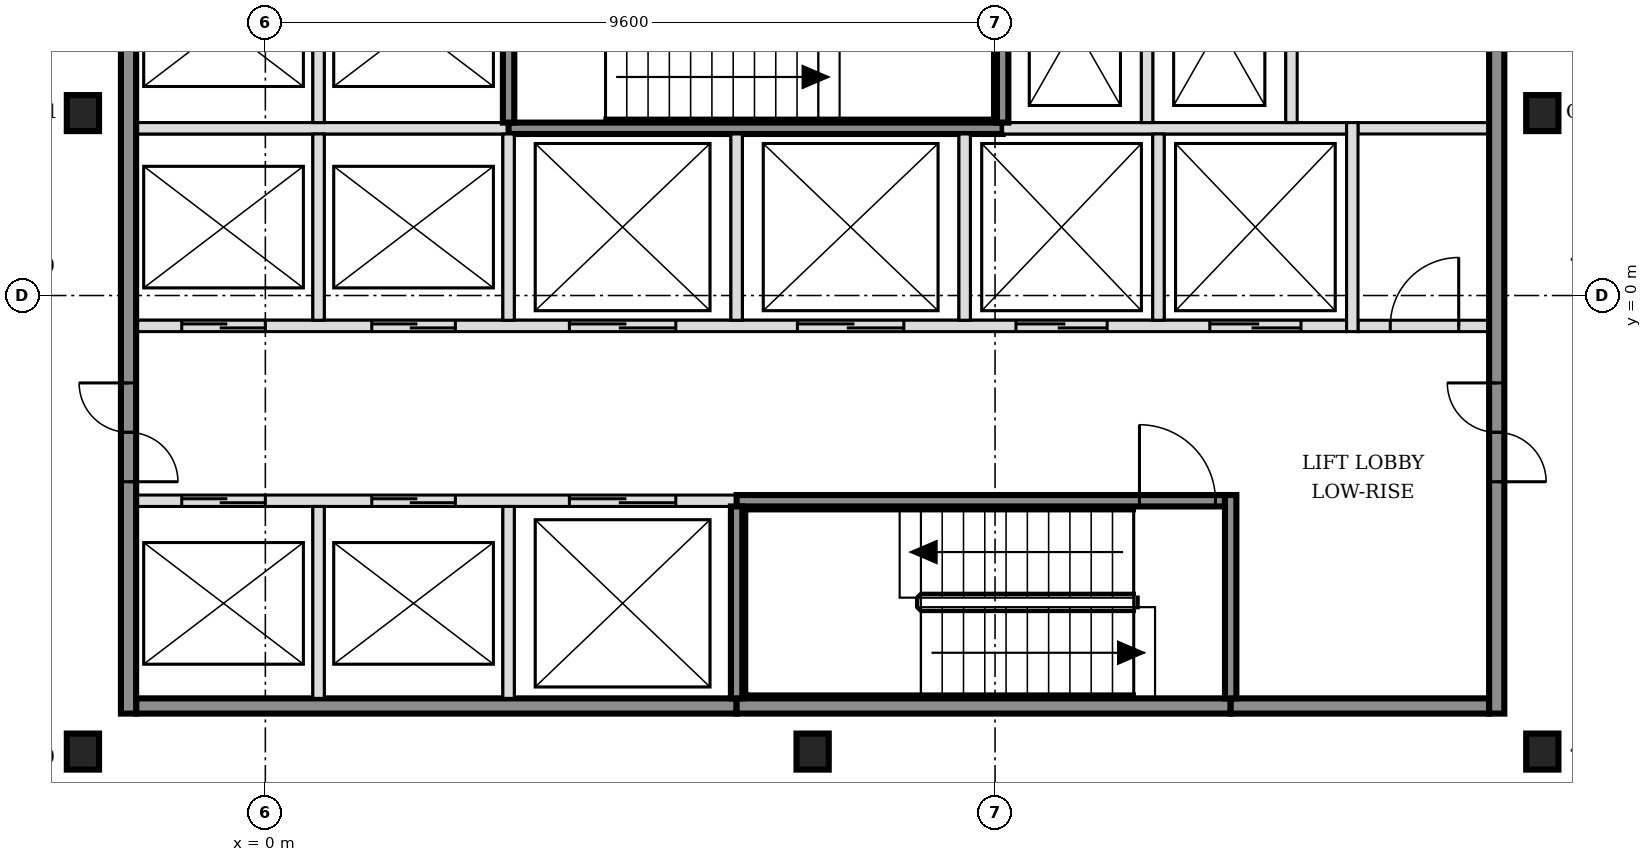
"""IFC4 building model, lengths in metres.
Left out: names, types, materials, properties, quantities, classifications, styles, units other than length and angle.
Written with IfcOpenShell. Run it as: python <this file> out.ifc"""

import sys

from ifc_helpers import new_model, si_unit, direction, frame, frame_2d, origin, origin_2d, place, context, subcontext, project, spatial, rectangle, i_section, extrude, element, fill, save


model = new_model("IFC4")
c1 = context("Model", 3, precision=1e-05, world=origin(), true_north=direction((0.0, 1.0)))
c2 = subcontext(c1, "Body", "Model", "MODEL_VIEW")
j1 = project(units=[si_unit("LENGTHUNIT", "METRE"), si_unit("PLANEANGLEUNIT", "RADIAN")], contexts=[c1])
p1 = place(None, origin())
s1 = spatial("IfcSite", under=j1, at=p1, CompositionType="ELEMENT")
p2 = place(p1, origin())
s2 = spatial("IfcBuilding", under=s1, at=p2, CompositionType="ELEMENT")
p3 = place(p2, frame((0.0, 0.0, 125.4)))
s3 = spatial("IfcBuildingStorey", under=s2, at=p3, CompositionType="ELEMENT", Elevation=125.4)
for number, where, z_axis, x_axis in (
    (1, (-2.4, -6.0, -0.15), (0.0, 0.0, 1.0), (1.0, 0.0, 0.0)),
    (2, (7.2, -6.0, -0.15), (0.0, 0.0, 1.0), (1.0, 0.0, 0.0)),
    (3, (16.8, -6.0, -0.15), (0.0, 0.0, 1.0), (1.0, 0.0, 0.0)),
    (4, (-2.4, 2.4, -0.15), (0.0, 0.0, 1.0), (1.0, 0.0, 0.0)),
    (5, (16.8, 2.4, -0.15), (0.0, 0.0, 1.0), (1.0, 0.0, 0.0)),
):
    element("IfcColumn", number, at=place(p3, frame(where, z_axis=z_axis, x_axis=x_axis)), inside=s3, PredefinedType="COLUMN", context=c2, shape_type="SweptSolid", body=[
        extrude(i_section(OverallWidth=0.424, OverallDepth=0.474, WebThickness=0.048, FlangeThickness=0.077, FilletRadius=0.015, at=origin_2d()), origin(), (0.0, 0.0, 1.0), 3.6),
    ])
p4 = place(p3, frame((-1.7, -5.4, 0.0), z_axis=(0.0, 0.0, 1.0), x_axis=(1.0, 0.0, 0.0)))
e6 = element("IfcWall", 6, at=p4, inside=s3, PredefinedType="SOLIDWALL", context=c2, shape_type="SweptSolid", body=[
    extrude(rectangle(XDim=7.9, YDim=0.2, at=frame_2d((3.95, 0.0))), origin(), (0.0, 0.0, 1.0), 3.45),
])
p5 = place(p3, frame((6.2, -5.4, 0.0), z_axis=(0.0, 0.0, 1.0), x_axis=(1.0, 0.0, 0.0)))
e7 = element("IfcWall", 7, at=p5, inside=s3, PredefinedType="SOLIDWALL", context=c2, shape_type="SweptSolid", body=[
    extrude(rectangle(XDim=6.5, YDim=0.2, at=frame_2d((3.25, 0.0))), origin(), (0.0, 0.0, 1.0), 3.45),
])
p6 = place(p3, frame((12.7, -5.4, 0.0), z_axis=(0.0, 0.0, 1.0), x_axis=(1.0, 0.0, 0.0)))
e8 = element("IfcWall", 8, at=p6, inside=s3, PredefinedType="SOLIDWALL", context=c2, shape_type="SweptSolid", body=[
    extrude(rectangle(XDim=3.4, YDim=0.2, at=frame_2d((1.7, 0.0))), origin(), (0.0, 0.0, 1.0), 3.45),
])
p7 = place(p3, frame((-1.7, -2.7, 0.0), z_axis=(0.0, 0.0, 1.0), x_axis=(1.0, 0.0, 0.0)))
e9 = element("IfcWall", 9, at=p7, inside=s3, PredefinedType="SOLIDWALL", context=c2, shape_type="SweptSolid", body=[
    extrude(rectangle(XDim=7.9, YDim=0.15, at=frame_2d((3.95, 0.0))), origin(), (0.0, 0.0, 1.0), 3.45),
])
p8 = place(p7, frame((0.6, 0.0, 0.0)))
e10 = element("IfcOpeningElement", 10, at=p8, cuts=e9, PredefinedType="OPENING", context=c2, shape_type="SweptSolid", body=[
    extrude(rectangle(XDim=1.1, YDim=2.1, at=frame_2d((0.55, 1.05))), frame((0.0, 0.085, 0.0), z_axis=(0.0, -1.0, 0.0), x_axis=(1.0, 0.0, 0.0)), (0.0, 0.0, 1.0), 0.17),
])
p9 = place(p7, frame((3.1, 0.0, 0.0)))
e11 = element("IfcOpeningElement", 11, at=p9, cuts=e9, PredefinedType="OPENING", context=c2, shape_type="SweptSolid", body=[
    extrude(rectangle(XDim=1.1, YDim=2.1, at=frame_2d((0.55, 1.05))), frame((0.0, 0.085, 0.0), z_axis=(0.0, -1.0, 0.0), x_axis=(1.0, 0.0, 0.0)), (0.0, 0.0, 1.0), 0.17),
])
p10 = place(p7, frame((5.7, 0.0, 0.0)))
e12 = element("IfcOpeningElement", 12, at=p10, cuts=e9, PredefinedType="OPENING", context=c2, shape_type="SweptSolid", body=[
    extrude(rectangle(XDim=1.4, YDim=2.1, at=frame_2d((0.7, 1.05))), frame((0.0, 0.085, 0.0), z_axis=(0.0, -1.0, 0.0), x_axis=(1.0, 0.0, 0.0)), (0.0, 0.0, 1.0), 0.17),
])
p11 = place(p3, frame((6.2, -2.7, 0.0), z_axis=(0.0, 0.0, 1.0), x_axis=(1.0, 0.0, 0.0)))
e13 = element("IfcWall", 13, at=p11, inside=s3, PredefinedType="SOLIDWALL", context=c2, shape_type="SweptSolid", body=[
    extrude(rectangle(XDim=6.425, YDim=0.15, at=frame_2d((3.212, 0.0))), origin(), (0.0, 0.0, 1.0), 3.45),
])
p12 = place(p11, frame((5.3, 0.0, 0.0)))
e14 = element("IfcOpeningElement", 14, at=p12, cuts=e13, PredefinedType="OPENING", context=c2, shape_type="SweptSolid", body=[
    extrude(rectangle(XDim=1.0, YDim=2.1, at=frame_2d((0.5, 1.05))), frame((0.0, 0.085, 0.0), z_axis=(0.0, -1.0, 0.0), x_axis=(1.0, 0.0, 0.0)), (0.0, 0.0, 1.0), 0.17),
])
p13 = place(p3, frame((-1.7, -0.4, 0.0), z_axis=(0.0, 0.0, 1.0), x_axis=(1.0, 0.0, 0.0)))
e15 = element("IfcWall", 15, at=p13, inside=s3, PredefinedType="SOLIDWALL", context=c2, shape_type="SweptSolid", body=[
    extrude(rectangle(XDim=15.925, YDim=0.15, at=frame_2d((7.962, 0.0))), origin(), (0.0, 0.0, 1.0), 3.45),
])
p14 = place(p13, frame((0.6, 0.0, 0.0)))
e16 = element("IfcOpeningElement", 16, at=p14, cuts=e15, PredefinedType="OPENING", context=c2, shape_type="SweptSolid", body=[
    extrude(rectangle(XDim=1.1, YDim=2.1, at=frame_2d((0.55, 1.05))), frame((0.0, 0.085, 0.0), z_axis=(0.0, -1.0, 0.0), x_axis=(1.0, 0.0, 0.0)), (0.0, 0.0, 1.0), 0.17),
])
p15 = place(p13, frame((3.1, 0.0, 0.0)))
e17 = element("IfcOpeningElement", 17, at=p15, cuts=e15, PredefinedType="OPENING", context=c2, shape_type="SweptSolid", body=[
    extrude(rectangle(XDim=1.1, YDim=2.1, at=frame_2d((0.55, 1.05))), frame((0.0, 0.085, 0.0), z_axis=(0.0, -1.0, 0.0), x_axis=(1.0, 0.0, 0.0)), (0.0, 0.0, 1.0), 0.17),
])
p16 = place(p13, frame((5.7, 0.0, 0.0)))
e18 = element("IfcOpeningElement", 18, at=p16, cuts=e15, PredefinedType="OPENING", context=c2, shape_type="SweptSolid", body=[
    extrude(rectangle(XDim=1.4, YDim=2.1, at=frame_2d((0.7, 1.05))), frame((0.0, 0.085, 0.0), z_axis=(0.0, -1.0, 0.0), x_axis=(1.0, 0.0, 0.0)), (0.0, 0.0, 1.0), 0.17),
])
p17 = place(p13, frame((8.7, 0.0, 0.0)))
e19 = element("IfcOpeningElement", 19, at=p17, cuts=e15, PredefinedType="OPENING", context=c2, shape_type="SweptSolid", body=[
    extrude(rectangle(XDim=1.4, YDim=2.1, at=frame_2d((0.7, 1.05))), frame((0.0, 0.085, 0.0), z_axis=(0.0, -1.0, 0.0), x_axis=(1.0, 0.0, 0.0)), (0.0, 0.0, 1.0), 0.17),
])
p18 = place(p13, frame((11.575, 0.0, 0.0)))
e20 = element("IfcOpeningElement", 20, at=p18, cuts=e15, PredefinedType="OPENING", context=c2, shape_type="SweptSolid", body=[
    extrude(rectangle(XDim=1.2, YDim=2.1, at=frame_2d((0.6, 1.05))), frame((0.0, 0.085, 0.0), z_axis=(0.0, -1.0, 0.0), x_axis=(1.0, 0.0, 0.0)), (0.0, 0.0, 1.0), 0.17),
])
p19 = place(p13, frame((14.125, 0.0, 0.0)))
e21 = element("IfcOpeningElement", 21, at=p19, cuts=e15, PredefinedType="OPENING", context=c2, shape_type="SweptSolid", body=[
    extrude(rectangle(XDim=1.2, YDim=2.1, at=frame_2d((0.6, 1.05))), frame((0.0, 0.085, 0.0), z_axis=(0.0, -1.0, 0.0), x_axis=(1.0, 0.0, 0.0)), (0.0, 0.0, 1.0), 0.17),
])
p20 = place(p3, frame((14.375, -0.4, 0.0), z_axis=(0.0, 0.0, 1.0), x_axis=(1.0, 0.0, 0.0)))
e22 = element("IfcWall", 22, at=p20, inside=s3, PredefinedType="PARTITIONING", context=c2, shape_type="SweptSolid", body=[
    extrude(rectangle(XDim=1.725, YDim=0.15, at=frame_2d((0.863, 0.0))), origin(), (0.0, 0.0, 1.0), 3.45),
])
p21 = place(p20, frame((0.425, 0.0, 0.0)))
e23 = element("IfcOpeningElement", 23, at=p21, cuts=e22, PredefinedType="OPENING", context=c2, shape_type="SweptSolid", body=[
    extrude(rectangle(XDim=0.9, YDim=2.1, at=frame_2d((0.45, 1.05))), frame((0.0, 0.085, 0.0), z_axis=(0.0, -1.0, 0.0), x_axis=(1.0, 0.0, 0.0)), (0.0, 0.0, 1.0), 0.17),
])
p22 = place(p3, frame((-1.7, 2.2, 0.0), z_axis=(0.0, 0.0, 1.0), x_axis=(1.0, 0.0, 0.0)))
e24 = element("IfcWall", 24, at=p22, inside=s3, PredefinedType="SOLIDWALL", context=c2, shape_type="SweptSolid", body=[
    extrude(rectangle(XDim=4.9, YDim=0.15, at=frame_2d((2.45, 0.0))), origin(), (0.0, 0.0, 1.0), 3.45),
])
p23 = place(p3, frame((3.2, 2.2, 0.0), z_axis=(0.0, 0.0, 1.0), x_axis=(1.0, 0.0, 0.0)))
e25 = element("IfcWall", 25, at=p23, inside=s3, PredefinedType="SOLIDWALL", context=c2, shape_type="SweptSolid", body=[
    extrude(rectangle(XDim=6.5, YDim=0.15, at=frame_2d((3.25, 0.0))), origin(), (0.0, 0.0, 1.0), 3.45),
])
p24 = place(p3, frame((9.7, 2.2, 0.0), z_axis=(0.0, 0.0, 1.0), x_axis=(1.0, 0.0, 0.0)))
e26 = element("IfcWall", 26, at=p24, inside=s3, PredefinedType="SOLIDWALL", context=c2, shape_type="SweptSolid", body=[
    extrude(rectangle(XDim=4.525, YDim=0.15, at=frame_2d((2.263, 0.0))), origin(), (0.0, 0.0, 1.0), 3.45),
])
p25 = place(p3, frame((14.375, 2.2, 0.0), z_axis=(0.0, 0.0, 1.0), x_axis=(1.0, 0.0, 0.0)))
e27 = element("IfcWall", 27, at=p25, inside=s3, PredefinedType="PARTITIONING", context=c2, shape_type="SweptSolid", body=[
    extrude(rectangle(XDim=1.725, YDim=0.15, at=frame_2d((0.863, 0.0))), origin(), (0.0, 0.0, 1.0), 3.45),
])
p26 = place(p3, frame((-1.8, -5.5, 0.0), z_axis=(0.0, 0.0, 1.0), x_axis=(0.0, 1.0, 0.0)))
e28 = element("IfcWall", 28, at=p26, inside=s3, PredefinedType="SOLIDWALL", context=c2, shape_type="SweptSolid", body=[
    extrude(rectangle(XDim=15.8, YDim=0.2, at=frame_2d((7.9, 0.0))), origin(), (0.0, 0.0, 1.0), 3.45),
])
p27 = place(p26, frame((3.05, 0.0, 0.0)))
e29 = element("IfcOpeningElement", 29, at=p27, cuts=e28, PredefinedType="OPENING", context=c2, shape_type="SweptSolid", body=[
    extrude(rectangle(XDim=1.3, YDim=2.1, at=frame_2d((0.65, 1.05))), frame((0.0, 0.11, 0.0), z_axis=(0.0, -1.0, 0.0), x_axis=(1.0, 0.0, 0.0)), (0.0, 0.0, 1.0), 0.22),
])
p28 = place(p26, frame((11.45, 0.0, 0.0)))
e30 = element("IfcOpeningElement", 30, at=p28, cuts=e28, PredefinedType="OPENING", context=c2, shape_type="SweptSolid", body=[
    extrude(rectangle(XDim=1.3, YDim=2.1, at=frame_2d((0.65, 1.05))), frame((0.0, 0.11, 0.0), z_axis=(0.0, -1.0, 0.0), x_axis=(1.0, 0.0, 0.0)), (0.0, 0.0, 1.0), 0.22),
])
p29 = place(p3, frame((0.7, -5.3, 0.0), z_axis=(0.0, 0.0, 1.0), x_axis=(0.0, 1.0, 0.0)))
e31 = element("IfcWall", 31, at=p29, inside=s3, PredefinedType="SOLIDWALL", context=c2, shape_type="SweptSolid", body=[
    extrude(rectangle(XDim=2.525, YDim=0.15, at=frame_2d((1.263, 0.0))), origin(), (0.0, 0.0, 1.0), 3.45),
])
p30 = place(p3, frame((0.7, -0.325, 0.0), z_axis=(0.0, 0.0, 1.0), x_axis=(0.0, 1.0, 0.0)))
e32 = element("IfcWall", 32, at=p30, inside=s3, PredefinedType="SOLIDWALL", context=c2, shape_type="SweptSolid", body=[
    extrude(rectangle(XDim=2.45, YDim=0.15, at=frame_2d((1.225, 0.0))), origin(), (0.0, 0.0, 1.0), 3.45),
])
p31 = place(p3, frame((0.7, 2.275, 0.0), z_axis=(0.0, 0.0, 1.0), x_axis=(0.0, 1.0, 0.0)))
e33 = element("IfcWall", 33, at=p31, inside=s3, PredefinedType="SOLIDWALL", context=c2, shape_type="SweptSolid", body=[
    extrude(rectangle(XDim=2.55, YDim=0.15, at=frame_2d((1.275, 0.0))), origin(), (0.0, 0.0, 1.0), 3.45),
])
p32 = place(p3, frame((3.2, -5.3, 0.0), z_axis=(0.0, 0.0, 1.0), x_axis=(0.0, 1.0, 0.0)))
e34 = element("IfcWall", 34, at=p32, inside=s3, PredefinedType="SOLIDWALL", context=c2, shape_type="SweptSolid", body=[
    extrude(rectangle(XDim=2.525, YDim=0.15, at=frame_2d((1.263, 0.0))), origin(), (0.0, 0.0, 1.0), 3.45),
])
p33 = place(p3, frame((3.2, -0.325, 0.0), z_axis=(0.0, 0.0, 1.0), x_axis=(0.0, 1.0, 0.0)))
e35 = element("IfcWall", 35, at=p33, inside=s3, PredefinedType="SOLIDWALL", context=c2, shape_type="SweptSolid", body=[
    extrude(rectangle(XDim=2.45, YDim=0.15, at=frame_2d((1.225, 0.0))), origin(), (0.0, 0.0, 1.0), 3.45),
])
p34 = place(p3, frame((3.2, 2.275, 0.0), z_axis=(0.0, 0.0, 1.0), x_axis=(0.0, 1.0, 0.0)))
e36 = element("IfcWall", 36, at=p34, inside=s3, PredefinedType="SOLIDWALL", context=c2, shape_type="SweptSolid", body=[
    extrude(rectangle(XDim=2.55, YDim=0.15, at=frame_2d((1.275, 0.0))), origin(), (0.0, 0.0, 1.0), 3.45),
])
p35 = place(p3, frame((6.2, -5.3, 0.0), z_axis=(0.0, 0.0, 1.0), x_axis=(0.0, 1.0, 0.0)))
e37 = element("IfcWall", 37, at=p35, inside=s3, PredefinedType="SOLIDWALL", context=c2, shape_type="SweptSolid", body=[
    extrude(rectangle(XDim=2.525, YDim=0.15, at=frame_2d((1.263, 0.0))), origin(), (0.0, 0.0, 1.0), 3.45),
])
for number, where, z_axis, x_axis in (
    (38, (6.2, -0.325, 0.0), (0.0, 0.0, 1.0), (0.0, 1.0, 0.0)),
    (39, (9.2, -0.325, 0.0), (0.0, 0.0, 1.0), (0.0, 1.0, 0.0)),
):
    element("IfcWall", number, at=place(p3, frame(where, z_axis=z_axis, x_axis=x_axis)), inside=s3, PredefinedType="SOLIDWALL", context=c2, shape_type="SweptSolid", body=[
        extrude(rectangle(XDim=2.45, YDim=0.15, at=frame_2d((1.225, 0.0))), origin(), (0.0, 0.0, 1.0), 3.45),
    ])
for number, where, z_axis, x_axis in (
    (40, (9.7, 2.275, 0.0), (0.0, 0.0, 1.0), (0.0, 1.0, 0.0)),
    (41, (11.6, 2.275, 0.0), (0.0, 0.0, 1.0), (0.0, 1.0, 0.0)),
):
    element("IfcWall", number, at=place(p3, frame(where, z_axis=z_axis, x_axis=x_axis)), inside=s3, PredefinedType="SOLIDWALL", context=c2, shape_type="SweptSolid", body=[
        extrude(rectangle(XDim=2.55, YDim=0.15, at=frame_2d((1.275, 0.0))), origin(), (0.0, 0.0, 1.0), 3.45),
    ])
p36 = place(p3, frame((11.75, -0.325, 0.0), z_axis=(0.0, 0.0, 1.0), x_axis=(0.0, 1.0, 0.0)))
e42 = element("IfcWall", 42, at=p36, inside=s3, PredefinedType="SOLIDWALL", context=c2, shape_type="SweptSolid", body=[
    extrude(rectangle(XDim=2.45, YDim=0.15, at=frame_2d((1.225, 0.0))), origin(), (0.0, 0.0, 1.0), 3.45),
])
p37 = place(p3, frame((12.7, -5.3, 0.0), z_axis=(0.0, 0.0, 1.0), x_axis=(0.0, 1.0, 0.0)))
e43 = element("IfcWall", 43, at=p37, inside=s3, PredefinedType="SOLIDWALL", context=c2, shape_type="SweptSolid", body=[
    extrude(rectangle(XDim=2.675, YDim=0.15, at=frame_2d((1.337, 0.0))), origin(), (0.0, 0.0, 1.0), 3.45),
])
p38 = place(p3, frame((13.5, 2.275, 0.0), z_axis=(0.0, 0.0, 1.0), x_axis=(0.0, 1.0, 0.0)))
e44 = element("IfcWall", 44, at=p38, inside=s3, PredefinedType="SOLIDWALL", context=c2, shape_type="SweptSolid", body=[
    extrude(rectangle(XDim=2.55, YDim=0.15, at=frame_2d((1.275, 0.0))), origin(), (0.0, 0.0, 1.0), 3.45),
])
p39 = place(p3, frame((14.3, -0.475, 0.0), z_axis=(0.0, 0.0, 1.0), x_axis=(0.0, 1.0, 0.0)))
e45 = element("IfcWall", 45, at=p39, inside=s3, PredefinedType="SOLIDWALL", context=c2, shape_type="SweptSolid", body=[
    extrude(rectangle(XDim=2.75, YDim=0.15, at=frame_2d((1.375, 0.0))), origin(), (0.0, 0.0, 1.0), 3.45),
])
p40 = place(p3, frame((16.2, -5.5, 0.0), z_axis=(0.0, 0.0, 1.0), x_axis=(0.0, 1.0, 0.0)))
e46 = element("IfcWall", 46, at=p40, inside=s3, PredefinedType="SOLIDWALL", context=c2, shape_type="SweptSolid", body=[
    extrude(rectangle(XDim=15.8, YDim=0.2, at=frame_2d((7.9, 0.0))), origin(), (0.0, 0.0, 1.0), 3.45),
])
p41 = place(p40, frame((3.05, 0.0, 0.0)))
e47 = element("IfcOpeningElement", 47, at=p41, cuts=e46, PredefinedType="OPENING", context=c2, shape_type="SweptSolid", body=[
    extrude(rectangle(XDim=1.3, YDim=2.1, at=frame_2d((0.65, 1.05))), frame((0.0, 0.11, 0.0), z_axis=(0.0, -1.0, 0.0), x_axis=(1.0, 0.0, 0.0)), (0.0, 0.0, 1.0), 0.22),
])
p42 = place(p40, frame((11.45, 0.0, 0.0)))
e48 = element("IfcOpeningElement", 48, at=p42, cuts=e46, PredefinedType="OPENING", context=c2, shape_type="SweptSolid", body=[
    extrude(rectangle(XDim=1.3, YDim=2.1, at=frame_2d((0.65, 1.05))), frame((0.0, 0.11, 0.0), z_axis=(0.0, -1.0, 0.0), x_axis=(1.0, 0.0, 0.0)), (0.0, 0.0, 1.0), 0.22),
])
p43 = place(p8, origin())
e49 = element("IfcDoor", 49, at=p43, inside=s3, OperationType="DOUBLE_DOOR_SLIDING", PredefinedType="DOOR", context=c2, shape_type="SweptSolid", body=[
    extrude(rectangle(XDim=1.1, YDim=2.1, at=frame_2d((0.55, 1.05))), frame((0.0, 0.025, 0.0), z_axis=(0.0, -1.0, 0.0), x_axis=(1.0, 0.0, 0.0)), (0.0, 0.0, 1.0), 0.05),
])
fill(e10, e49)
p44 = place(p9, origin())
e50 = element("IfcDoor", 50, at=p44, inside=s3, OperationType="DOUBLE_DOOR_SLIDING", PredefinedType="DOOR", context=c2, shape_type="SweptSolid", body=[
    extrude(rectangle(XDim=1.1, YDim=2.1, at=frame_2d((0.55, 1.05))), frame((0.0, 0.025, 0.0), z_axis=(0.0, -1.0, 0.0), x_axis=(1.0, 0.0, 0.0)), (0.0, 0.0, 1.0), 0.05),
])
fill(e11, e50)
p45 = place(p14, origin())
e51 = element("IfcDoor", 51, at=p45, inside=s3, OperationType="DOUBLE_DOOR_SLIDING", PredefinedType="DOOR", context=c2, shape_type="SweptSolid", body=[
    extrude(rectangle(XDim=1.1, YDim=2.1, at=frame_2d((0.55, 1.05))), frame((0.0, 0.025, 0.0), z_axis=(0.0, -1.0, 0.0), x_axis=(1.0, 0.0, 0.0)), (0.0, 0.0, 1.0), 0.05),
])
fill(e16, e51)
p46 = place(p15, origin())
e52 = element("IfcDoor", 52, at=p46, inside=s3, OperationType="DOUBLE_DOOR_SLIDING", PredefinedType="DOOR", context=c2, shape_type="SweptSolid", body=[
    extrude(rectangle(XDim=1.1, YDim=2.1, at=frame_2d((0.55, 1.05))), frame((0.0, 0.025, 0.0), z_axis=(0.0, -1.0, 0.0), x_axis=(1.0, 0.0, 0.0)), (0.0, 0.0, 1.0), 0.05),
])
fill(e17, e52)
p47 = place(p10, origin())
e53 = element("IfcDoor", 53, at=p47, inside=s3, OperationType="DOUBLE_DOOR_SLIDING", PredefinedType="DOOR", context=c2, shape_type="SweptSolid", body=[
    extrude(rectangle(XDim=1.4, YDim=2.1, at=frame_2d((0.7, 1.05))), frame((0.0, 0.025, 0.0), z_axis=(0.0, -1.0, 0.0), x_axis=(1.0, 0.0, 0.0)), (0.0, 0.0, 1.0), 0.05),
])
fill(e12, e53)
p48 = place(p16, origin())
e54 = element("IfcDoor", 54, at=p48, inside=s3, OperationType="DOUBLE_DOOR_SLIDING", PredefinedType="DOOR", context=c2, shape_type="SweptSolid", body=[
    extrude(rectangle(XDim=1.4, YDim=2.1, at=frame_2d((0.7, 1.05))), frame((0.0, 0.025, 0.0), z_axis=(0.0, -1.0, 0.0), x_axis=(1.0, 0.0, 0.0)), (0.0, 0.0, 1.0), 0.05),
])
fill(e18, e54)
p49 = place(p17, origin())
e55 = element("IfcDoor", 55, at=p49, inside=s3, OperationType="DOUBLE_DOOR_SLIDING", PredefinedType="DOOR", context=c2, shape_type="SweptSolid", body=[
    extrude(rectangle(XDim=1.4, YDim=2.1, at=frame_2d((0.7, 1.05))), frame((0.0, 0.025, 0.0), z_axis=(0.0, -1.0, 0.0), x_axis=(1.0, 0.0, 0.0)), (0.0, 0.0, 1.0), 0.05),
])
fill(e19, e55)
p50 = place(p18, origin())
e56 = element("IfcDoor", 56, at=p50, inside=s3, OperationType="DOUBLE_DOOR_SLIDING", PredefinedType="DOOR", context=c2, shape_type="SweptSolid", body=[
    extrude(rectangle(XDim=1.2, YDim=2.1, at=frame_2d((0.6, 1.05))), frame((0.0, 0.025, 0.0), z_axis=(0.0, -1.0, 0.0), x_axis=(1.0, 0.0, 0.0)), (0.0, 0.0, 1.0), 0.05),
])
fill(e20, e56)
p51 = place(p19, origin())
e57 = element("IfcDoor", 57, at=p51, inside=s3, OperationType="DOUBLE_DOOR_SLIDING", PredefinedType="DOOR", context=c2, shape_type="SweptSolid", body=[
    extrude(rectangle(XDim=1.2, YDim=2.1, at=frame_2d((0.6, 1.05))), frame((0.0, 0.025, 0.0), z_axis=(0.0, -1.0, 0.0), x_axis=(1.0, 0.0, 0.0)), (0.0, 0.0, 1.0), 0.05),
])
fill(e21, e57)
p52 = place(p12, origin())
e58 = element("IfcDoor", 58, at=p52, inside=s3, OperationType="SINGLE_SWING_LEFT", PredefinedType="DOOR", context=c2, shape_type="SweptSolid", body=[
    extrude(rectangle(XDim=1.0, YDim=2.1, at=frame_2d((0.5, 1.05))), frame((0.0, 0.025, 0.0), z_axis=(0.0, -1.0, 0.0), x_axis=(1.0, 0.0, 0.0)), (0.0, 0.0, 1.0), 0.05),
])
fill(e14, e58)
p53 = place(p27, origin())
e59 = element("IfcDoor", 59, at=p53, inside=s3, OperationType="DOUBLE_DOOR_SINGLE_SWING", PredefinedType="DOOR", context=c2, shape_type="SweptSolid", body=[
    extrude(rectangle(XDim=1.3, YDim=2.1, at=frame_2d((0.65, 1.05))), frame((0.0, 0.025, 0.0), z_axis=(0.0, -1.0, 0.0), x_axis=(1.0, 0.0, 0.0)), (0.0, 0.0, 1.0), 0.05),
])
fill(e29, e59)
p54 = place(p41, origin())
e60 = element("IfcDoor", 60, at=p54, inside=s3, OperationType="DOUBLE_DOOR_SINGLE_SWING", PredefinedType="DOOR", context=c2, shape_type="SweptSolid", body=[
    extrude(rectangle(XDim=1.3, YDim=2.1, at=frame_2d((0.65, 1.05))), frame((0.0, 0.025, 0.0), z_axis=(0.0, -1.0, 0.0), x_axis=(1.0, 0.0, 0.0)), (0.0, 0.0, 1.0), 0.05),
])
fill(e47, e60)
p55 = place(p21, origin())
e61 = element("IfcDoor", 61, at=p55, inside=s3, OperationType="SINGLE_SWING_RIGHT", PredefinedType="DOOR", context=c2, shape_type="SweptSolid", body=[
    extrude(rectangle(XDim=0.9, YDim=2.1, at=frame_2d((0.45, 1.05))), frame((0.0, 0.025, 0.0), z_axis=(0.0, -1.0, 0.0), x_axis=(1.0, 0.0, 0.0)), (0.0, 0.0, 1.0), 0.05),
])
fill(e23, e61)
save(model, sys.argv[1])
